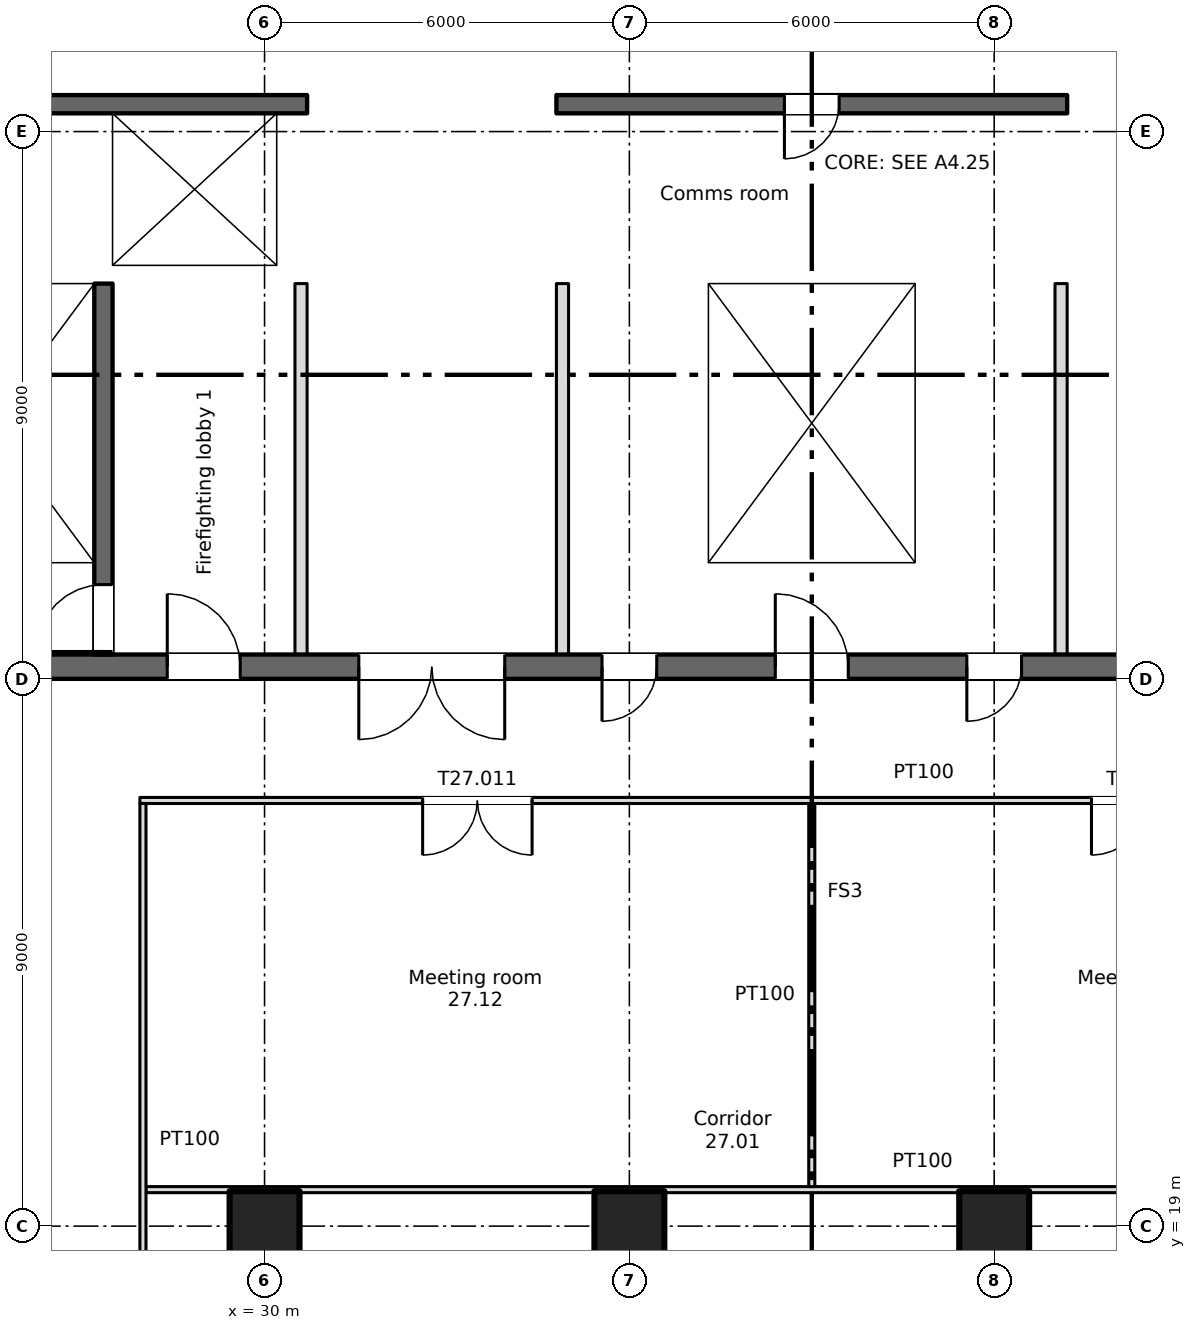
"""IFC4 building model, lengths in metres.
Left out: names, types, materials, properties, quantities, classifications, styles, units other than length and angle.
Written with IfcOpenShell. Run it as: python <this file> out.ifc"""

import sys

from ifc_helpers import new_model, si_unit, direction, frame, frame_2d, origin, origin_2d, place, context, subcontext, project, spatial, rectangle, extrude, element, fill, save


model = new_model("IFC4")
c1 = context("Model", 3, precision=1e-05, world=origin(), true_north=direction((0.0, 1.0)))
c2 = subcontext(c1, "Body", "Model", "MODEL_VIEW")
j1 = project(units=[si_unit("LENGTHUNIT", "METRE"), si_unit("PLANEANGLEUNIT", "RADIAN")], contexts=[c1])
p1 = place(None, origin())
s1 = spatial("IfcSite", under=j1, at=p1, CompositionType="ELEMENT")
p2 = place(p1, origin())
s2 = spatial("IfcBuilding", under=s1, at=p2, CompositionType="ELEMENT")
p3 = place(p2, frame((0.0, 0.0, 185.5)))
s3 = spatial("IfcBuildingStorey", under=s2, at=p3, CompositionType="ELEMENT", Elevation=185.5)
for number, where, z_axis, x_axis in (
    (1, (30.0, 19.0, 0.0), (0.0, 0.0, 1.0), (1.0, 0.0, 0.0)),
    (2, (36.0, 19.0, 0.0), (0.0, 0.0, 1.0), (1.0, 0.0, 0.0)),
    (3, (42.0, 19.0, 0.0), (0.0, 0.0, 1.0), (1.0, 0.0, 0.0)),
):
    element("IfcColumn", number, at=place(p3, frame(where, z_axis=z_axis, x_axis=x_axis)), inside=s3, PredefinedType="COLUMN", context=c2, shape_type="SweptSolid", body=[
        extrude(rectangle(XDim=1.15, YDim=1.15, at=origin_2d()), origin(), (0.0, 0.0, 1.0), 3.35),
    ])
p4 = place(p3, frame((6.6, 28.2, 0.0), z_axis=(0.0, 0.0, 1.0), x_axis=(1.0, 0.0, 0.0)))
e4 = element("IfcWall", 4, at=p4, inside=s3, PredefinedType="SHEAR", context=c2, shape_type="SweptSolid", body=[
    extrude(rectangle(XDim=57.9, YDim=0.4, at=frame_2d((28.95, 0.0))), origin(), (0.0, 0.0, 1.0), 3.35),
])
p5 = place(p4, frame((12.913, 0.0, 0.0)))
e5 = element("IfcOpeningElement", 5, at=p5, cuts=e4, PredefinedType="OPENING", context=c2, shape_type="SweptSolid", body=[
    extrude(rectangle(XDim=0.9, YDim=2.1, at=frame_2d((0.45, 1.05))), frame((0.0, 0.21, 0.0), z_axis=(0.0, -1.0, 0.0), x_axis=(1.0, 0.0, 0.0)), (0.0, 0.0, 1.0), 0.42),
])
p6 = place(p4, frame((15.488, 0.0, 0.0)))
e6 = element("IfcOpeningElement", 6, at=p6, cuts=e4, PredefinedType="OPENING", context=c2, shape_type="SweptSolid", body=[
    extrude(rectangle(XDim=0.9, YDim=2.1, at=frame_2d((0.45, 1.05))), frame((0.0, 0.21, 0.0), z_axis=(0.0, -1.0, 0.0), x_axis=(1.0, 0.0, 0.0)), (0.0, 0.0, 1.0), 0.42),
])
p7 = place(p4, frame((48.413, 0.0, 0.0)))
e7 = element("IfcOpeningElement", 7, at=p7, cuts=e4, PredefinedType="OPENING", context=c2, shape_type="SweptSolid", body=[
    extrude(rectangle(XDim=0.9, YDim=2.1, at=frame_2d((0.45, 1.05))), frame((0.0, 0.21, 0.0), z_axis=(0.0, -1.0, 0.0), x_axis=(1.0, 0.0, 0.0)), (0.0, 0.0, 1.0), 0.42),
])
p8 = place(p4, frame((50.988, 0.0, 0.0)))
e8 = element("IfcOpeningElement", 8, at=p8, cuts=e4, PredefinedType="OPENING", context=c2, shape_type="SweptSolid", body=[
    extrude(rectangle(XDim=0.9, YDim=2.1, at=frame_2d((0.45, 1.05))), frame((0.0, 0.21, 0.0), z_axis=(0.0, -1.0, 0.0), x_axis=(1.0, 0.0, 0.0)), (0.0, 0.0, 1.0), 0.42),
])
p9 = place(p4, frame((0.663, 0.0, 0.0)))
e9 = element("IfcOpeningElement", 9, at=p9, cuts=e4, PredefinedType="OPENING", context=c2, shape_type="SweptSolid", body=[
    extrude(rectangle(XDim=0.9, YDim=2.1, at=frame_2d((0.45, 1.05))), frame((0.0, 0.21, 0.0), z_axis=(0.0, -1.0, 0.0), x_axis=(1.0, 0.0, 0.0)), (0.0, 0.0, 1.0), 0.42),
])
p10 = place(p4, frame((2.238, 0.0, 0.0)))
e10 = element("IfcOpeningElement", 10, at=p10, cuts=e4, PredefinedType="OPENING", context=c2, shape_type="SweptSolid", body=[
    extrude(rectangle(XDim=0.9, YDim=2.1, at=frame_2d((0.45, 1.05))), frame((0.0, 0.21, 0.0), z_axis=(0.0, -1.0, 0.0), x_axis=(1.0, 0.0, 0.0)), (0.0, 0.0, 1.0), 0.42),
])
p11 = place(p4, frame((4.8, 0.0, 0.0)))
e11 = element("IfcOpeningElement", 11, at=p11, cuts=e4, PredefinedType="OPENING", context=c2, shape_type="SweptSolid", body=[
    extrude(rectangle(XDim=1.2, YDim=2.1, at=frame_2d((0.6, 1.05))), frame((0.0, 0.21, 0.0), z_axis=(0.0, -1.0, 0.0), x_axis=(1.0, 0.0, 0.0)), (0.0, 0.0, 1.0), 0.42),
])
p12 = place(p4, frame((31.8, 0.0, 0.0)))
e12 = element("IfcOpeningElement", 12, at=p12, cuts=e4, PredefinedType="OPENING", context=c2, shape_type="SweptSolid", body=[
    extrude(rectangle(XDim=1.2, YDim=2.1, at=frame_2d((0.6, 1.05))), frame((0.0, 0.21, 0.0), z_axis=(0.0, -1.0, 0.0), x_axis=(1.0, 0.0, 0.0)), (0.0, 0.0, 1.0), 0.42),
])
p13 = place(p4, frame((55.3, 0.0, 0.0)))
e13 = element("IfcOpeningElement", 13, at=p13, cuts=e4, PredefinedType="OPENING", context=c2, shape_type="SweptSolid", body=[
    extrude(rectangle(XDim=1.2, YDim=2.1, at=frame_2d((0.6, 1.05))), frame((0.0, 0.21, 0.0), z_axis=(0.0, -1.0, 0.0), x_axis=(1.0, 0.0, 0.0)), (0.0, 0.0, 1.0), 0.42),
])
p14 = place(p4, frame((21.8, 0.0, 0.0)))
e14 = element("IfcOpeningElement", 14, at=p14, cuts=e4, PredefinedType="OPENING", context=c2, shape_type="SweptSolid", body=[
    extrude(rectangle(XDim=1.2, YDim=2.1, at=frame_2d((0.6, 1.05))), frame((0.0, 0.21, 0.0), z_axis=(0.0, -1.0, 0.0), x_axis=(1.0, 0.0, 0.0)), (0.0, 0.0, 1.0), 0.42),
])
p15 = place(p4, frame((41.8, 0.0, 0.0)))
e15 = element("IfcOpeningElement", 15, at=p15, cuts=e4, PredefinedType="OPENING", context=c2, shape_type="SweptSolid", body=[
    extrude(rectangle(XDim=1.2, YDim=2.1, at=frame_2d((0.6, 1.05))), frame((0.0, 0.21, 0.0), z_axis=(0.0, -1.0, 0.0), x_axis=(1.0, 0.0, 0.0)), (0.0, 0.0, 1.0), 0.42),
])
p16 = place(p4, frame((24.95, 0.0, 0.0)))
e16 = element("IfcOpeningElement", 16, at=p16, cuts=e4, PredefinedType="OPENING", context=c2, shape_type="SweptSolid", body=[
    extrude(rectangle(XDim=2.4, YDim=2.1, at=frame_2d((1.2, 1.05))), frame((0.0, 0.21, 0.0), z_axis=(0.0, -1.0, 0.0), x_axis=(1.0, 0.0, 0.0)), (0.0, 0.0, 1.0), 0.42),
])
p17 = place(p4, frame((37.45, 0.0, 0.0)))
e17 = element("IfcOpeningElement", 17, at=p17, cuts=e4, PredefinedType="OPENING", context=c2, shape_type="SweptSolid", body=[
    extrude(rectangle(XDim=2.4, YDim=2.1, at=frame_2d((1.2, 1.05))), frame((0.0, 0.21, 0.0), z_axis=(0.0, -1.0, 0.0), x_axis=(1.0, 0.0, 0.0)), (0.0, 0.0, 1.0), 0.42),
])
p18 = place(p4, frame((8.1, 0.0, 0.0)))
e18 = element("IfcOpeningElement", 18, at=p18, cuts=e4, PredefinedType="OPENING", context=c2, shape_type="SweptSolid", body=[
    extrude(rectangle(XDim=2.4, YDim=2.1, at=frame_2d((1.2, 1.05))), frame((0.0, 0.21, 0.0), z_axis=(0.0, -1.0, 0.0), x_axis=(1.0, 0.0, 0.0)), (0.0, 0.0, 1.0), 0.42),
])
p19 = place(p4, frame((28.95, 0.0, 0.0)))
e19 = element("IfcOpeningElement", 19, at=p19, cuts=e4, PredefinedType="OPENING", context=c2, shape_type="SweptSolid", body=[
    extrude(rectangle(XDim=0.9, YDim=2.1, at=frame_2d((0.45, 1.05))), frame((0.0, 0.21, 0.0), z_axis=(0.0, -1.0, 0.0), x_axis=(1.0, 0.0, 0.0)), (0.0, 0.0, 1.0), 0.42),
])
p20 = place(p4, frame((34.95, 0.0, 0.0)))
e20 = element("IfcOpeningElement", 20, at=p20, cuts=e4, PredefinedType="OPENING", context=c2, shape_type="SweptSolid", body=[
    extrude(rectangle(XDim=0.9, YDim=2.1, at=frame_2d((0.45, 1.05))), frame((0.0, 0.21, 0.0), z_axis=(0.0, -1.0, 0.0), x_axis=(1.0, 0.0, 0.0)), (0.0, 0.0, 1.0), 0.42),
])
p21 = place(p3, frame((27.35, 28.4, 0.0), z_axis=(0.0, 0.0, 1.0), x_axis=(0.0, 1.0, 0.0)))
e21 = element("IfcWall", 21, at=p21, inside=s3, PredefinedType="SHEAR", context=c2, shape_type="SweptSolid", body=[
    extrude(rectangle(XDim=6.1, YDim=0.3, at=frame_2d((3.05, 0.0))), origin(), (0.0, 0.0, 1.0), 3.35),
])
p22 = place(p21, frame((0.05, 0.0, 0.0)))
e22 = element("IfcOpeningElement", 22, at=p22, cuts=e21, PredefinedType="OPENING", context=c2, shape_type="SweptSolid", body=[
    extrude(rectangle(XDim=1.1, YDim=2.1, at=frame_2d((0.55, 1.05))), frame((0.0, 0.16, 0.0), z_axis=(0.0, -1.0, 0.0), x_axis=(1.0, 0.0, 0.0)), (0.0, 0.0, 1.0), 0.32),
])
for number, where, z_axis, x_axis in (
    (23, (37.15, 28.4, 0.0), (0.0, 0.0, 1.0), (0.0, 1.0, 0.0)),
    (24, (40.85, 28.4, 0.0), (0.0, 0.0, 1.0), (0.0, 1.0, 0.0)),
):
    element("IfcWall", number, at=place(p3, frame(where, z_axis=z_axis, x_axis=x_axis)), inside=s3, PredefinedType="SHEAR", context=c2, shape_type="SweptSolid", body=[
        extrude(rectangle(XDim=6.1, YDim=0.3, at=frame_2d((3.05, 0.0))), origin(), (0.0, 0.0, 1.0), 3.35),
    ])
p23 = place(p3, frame((18.5, 34.65, 0.0), z_axis=(0.0, 0.0, 1.0), x_axis=(1.0, 0.0, 0.0)))
e25 = element("IfcWall", 25, at=p23, inside=s3, PredefinedType="SHEAR", context=c2, shape_type="SweptSolid", body=[
    extrude(rectangle(XDim=12.2, YDim=0.3, at=frame_2d((6.1, 0.0))), origin(), (0.0, 0.0, 1.0), 3.35),
])
p24 = place(p23, frame((9.8, 0.0, 0.0)))
e26 = element("IfcOpeningElement", 26, at=p24, cuts=e25, PredefinedType="OPENING", context=c2, shape_type="SweptSolid", body=[
    extrude(rectangle(XDim=1.1, YDim=2.1, at=frame_2d((0.55, 1.05))), frame((0.0, 0.16, 0.0), z_axis=(0.0, -1.0, 0.0), x_axis=(1.0, 0.0, 0.0)), (0.0, 0.0, 1.0), 0.32),
])
p25 = place(p3, frame((34.8, 34.65, 0.0), z_axis=(0.0, 0.0, 1.0), x_axis=(1.0, 0.0, 0.0)))
e27 = element("IfcWall", 27, at=p25, inside=s3, PredefinedType="SHEAR", context=c2, shape_type="SweptSolid", body=[
    extrude(rectangle(XDim=8.4, YDim=0.3, at=frame_2d((4.2, 0.0))), origin(), (0.0, 0.0, 1.0), 3.35),
])
p26 = place(p3, frame((30.7, 37.45, 0.0), z_axis=(0.0, 0.0, 1.0), x_axis=(-1.0, 0.0, 0.0)))
e28 = element("IfcWall", 28, at=p26, inside=s3, PredefinedType="SHEAR", context=c2, shape_type="SweptSolid", body=[
    extrude(rectangle(XDim=12.2, YDim=0.3, at=frame_2d((6.1, 0.0))), origin(), (0.0, 0.0, 1.0), 3.35),
])
p27 = place(p26, frame((7.4, 0.0, 0.0)))
e29 = element("IfcOpeningElement", 29, at=p27, cuts=e28, PredefinedType="OPENING", context=c2, shape_type="SweptSolid", body=[
    extrude(rectangle(XDim=0.9, YDim=2.1, at=frame_2d((0.45, 1.05))), frame((0.0, 0.16, 0.0), z_axis=(0.0, -1.0, 0.0), x_axis=(1.0, 0.0, 0.0)), (0.0, 0.0, 1.0), 0.32),
])
p28 = place(p3, frame((43.2, 37.45, 0.0), z_axis=(0.0, 0.0, 1.0), x_axis=(-1.0, 0.0, 0.0)))
e30 = element("IfcWall", 30, at=p28, inside=s3, PredefinedType="SHEAR", context=c2, shape_type="SweptSolid", body=[
    extrude(rectangle(XDim=8.4, YDim=0.3, at=frame_2d((4.2, 0.0))), origin(), (0.0, 0.0, 1.0), 3.35),
])
p29 = place(p28, frame((3.75, 0.0, 0.0)))
e31 = element("IfcOpeningElement", 31, at=p29, cuts=e30, PredefinedType="OPENING", context=c2, shape_type="SweptSolid", body=[
    extrude(rectangle(XDim=0.9, YDim=2.1, at=frame_2d((0.45, 1.05))), frame((0.0, 0.16, 0.0), z_axis=(0.0, -1.0, 0.0), x_axis=(1.0, 0.0, 0.0)), (0.0, 0.0, 1.0), 0.32),
])
p30 = place(p3, frame((27.35, 34.8, 0.0), z_axis=(0.0, 0.0, 1.0), x_axis=(0.0, 1.0, 0.0)))
e32 = element("IfcWall", 32, at=p30, inside=s3, PredefinedType="SHEAR", context=c2, shape_type="SweptSolid", body=[
    extrude(rectangle(XDim=2.5, YDim=0.3, at=frame_2d((1.25, 0.0))), origin(), (0.0, 0.0, 1.0), 3.35),
])
p31 = place(p3, frame((30.45, 34.8, 0.0), z_axis=(0.0, 0.0, 1.0), x_axis=(0.0, 1.0, 0.0)))
e33 = element("IfcWall", 33, at=p31, inside=s3, PredefinedType="SHEAR", context=c2, shape_type="SweptSolid", body=[
    extrude(rectangle(XDim=2.5, YDim=0.5, at=frame_2d((1.25, 0.0))), origin(), (0.0, 0.0, 1.0), 3.35),
])
for number, where, z_axis, x_axis in (
    (34, (34.95, 34.8, 0.0), (0.0, 0.0, 1.0), (0.0, 1.0, 0.0)),
    (35, (43.05, 34.8, 0.0), (0.0, 0.0, 1.0), (0.0, 1.0, 0.0)),
):
    element("IfcWall", number, at=place(p3, frame(where, z_axis=z_axis, x_axis=x_axis)), inside=s3, PredefinedType="SHEAR", context=c2, shape_type="SweptSolid", body=[
        extrude(rectangle(XDim=2.5, YDim=0.3, at=frame_2d((1.25, 0.0))), origin(), (0.0, 0.0, 1.0), 3.35),
    ])
for number, where, z_axis, x_axis in (
    (36, (30.6, 28.4, 0.0), (0.0, 0.0, 1.0), (0.0, 1.0, 0.0)),
    (37, (34.9, 28.4, 0.0), (0.0, 0.0, 1.0), (0.0, 1.0, 0.0)),
    (38, (43.1, 28.4, 0.0), (0.0, 0.0, 1.0), (0.0, 1.0, 0.0)),
):
    element("IfcWall", number, at=place(p3, frame(where, z_axis=z_axis, x_axis=x_axis)), inside=s3, PredefinedType="PARTITIONING", context=c2, shape_type="SweptSolid", body=[
        extrude(rectangle(XDim=6.1, YDim=0.2, at=frame_2d((3.05, 0.0))), origin(), (0.0, 0.0, 1.0), 3.35),
    ])
p32 = place(p3, frame((28.05, 19.6, 0.0), z_axis=(0.0, 0.0, 1.0), x_axis=(1.0, 0.0, 0.0)))
e39 = element("IfcWall", 39, at=p32, inside=s3, PredefinedType="PARTITIONING", context=c2, shape_type="SweptSolid", body=[
    extrude(rectangle(XDim=21.9, YDim=0.1, at=frame_2d((10.95, 0.0))), origin(), (0.0, 0.0, 1.0), 3.35),
])
p33 = place(p3, frame((27.95, 26.0, 0.0), z_axis=(0.0, 0.0, 1.0), x_axis=(1.0, 0.0, 0.0)))
e40 = element("IfcWall", 40, at=p33, inside=s3, PredefinedType="PARTITIONING", context=c2, shape_type="SweptSolid", body=[
    extrude(rectangle(XDim=22.1, YDim=0.1, at=frame_2d((11.05, 0.0))), origin(), (0.0, 0.0, 1.0), 3.35),
])
p34 = place(p33, frame((4.65, 0.0, 0.0)))
e41 = element("IfcOpeningElement", 41, at=p34, cuts=e40, PredefinedType="OPENING", context=c2, shape_type="SweptSolid", body=[
    extrude(rectangle(XDim=1.8, YDim=2.1, at=frame_2d((0.9, 1.05))), frame((0.0, 0.06, 0.0), z_axis=(0.0, -1.0, 0.0), x_axis=(1.0, 0.0, 0.0)), (0.0, 0.0, 1.0), 0.12),
])
p35 = place(p33, frame((15.65, 0.0, 0.0)))
e42 = element("IfcOpeningElement", 42, at=p35, cuts=e40, PredefinedType="OPENING", context=c2, shape_type="SweptSolid", body=[
    extrude(rectangle(XDim=1.8, YDim=2.1, at=frame_2d((0.9, 1.05))), frame((0.0, 0.06, 0.0), z_axis=(0.0, -1.0, 0.0), x_axis=(1.0, 0.0, 0.0)), (0.0, 0.0, 1.0), 0.12),
])
p36 = place(p3, frame((28.0, 12.65, 0.0), z_axis=(0.0, 0.0, 1.0), x_axis=(0.0, 1.0, 0.0)))
e43 = element("IfcWall", 43, at=p36, inside=s3, PredefinedType="PARTITIONING", context=c2, shape_type="SweptSolid", body=[
    extrude(rectangle(XDim=13.3, YDim=0.1, at=frame_2d((6.65, 0.0))), origin(), (0.0, 0.0, 1.0), 3.35),
])
p37 = place(p3, frame((39.0, 19.65, 0.0), z_axis=(0.0, 0.0, 1.0), x_axis=(0.0, 1.0, 0.0)))
e44 = element("IfcWall", 44, at=p37, inside=s3, PredefinedType="PARTITIONING", context=c2, shape_type="SweptSolid", body=[
    extrude(rectangle(XDim=6.3, YDim=0.1, at=frame_2d((3.15, 0.0))), origin(), (0.0, 0.0, 1.0), 3.35),
])
p38 = place(p29, origin())
e45 = element("IfcDoor", 45, at=p38, inside=s3, OperationType="SINGLE_SWING_RIGHT", PredefinedType="DOOR", context=c2, shape_type="SweptSolid", body=[
    extrude(rectangle(XDim=0.9, YDim=2.1, at=frame_2d((0.45, 1.05))), frame((0.0, 0.025, 0.0), z_axis=(0.0, -1.0, 0.0), x_axis=(1.0, 0.0, 0.0)), (0.0, 0.0, 1.0), 0.05),
])
fill(e31, e45)
p39 = place(p24, origin())
e46 = element("IfcDoor", 46, at=p39, inside=s3, OperationType="SLIDING_TO_LEFT", PredefinedType="DOOR", context=c2, shape_type="SweptSolid", body=[
    extrude(rectangle(XDim=1.1, YDim=2.1, at=frame_2d((0.55, 1.05))), frame((0.0, 0.025, 0.0), z_axis=(0.0, -1.0, 0.0), x_axis=(1.0, 0.0, 0.0)), (0.0, 0.0, 1.0), 0.05),
])
fill(e26, e46)
p40 = place(p22, origin())
e47 = element("IfcDoor", 47, at=p40, inside=s3, OperationType="SINGLE_SWING_LEFT", PredefinedType="DOOR", context=c2, shape_type="SweptSolid", body=[
    extrude(rectangle(XDim=1.1, YDim=2.1, at=frame_2d((0.55, 1.05))), frame((0.0, 0.025, 0.0), z_axis=(0.0, -1.0, 0.0), x_axis=(1.0, 0.0, 0.0)), (0.0, 0.0, 1.0), 0.05),
])
fill(e22, e47)
p41 = place(p12, origin())
e48 = element("IfcDoor", 48, at=p41, inside=s3, OperationType="SINGLE_SWING_LEFT", PredefinedType="DOOR", context=c2, shape_type="SweptSolid", body=[
    extrude(rectangle(XDim=1.2, YDim=2.1, at=frame_2d((0.6, 1.05))), frame((0.0, 0.025, 0.0), z_axis=(0.0, -1.0, 0.0), x_axis=(1.0, 0.0, 0.0)), (0.0, 0.0, 1.0), 0.05),
])
fill(e12, e48)
p42 = place(p14, origin())
e49 = element("IfcDoor", 49, at=p42, inside=s3, OperationType="SINGLE_SWING_LEFT", PredefinedType="DOOR", context=c2, shape_type="SweptSolid", body=[
    extrude(rectangle(XDim=1.2, YDim=2.1, at=frame_2d((0.6, 1.05))), frame((0.0, 0.025, 0.0), z_axis=(0.0, -1.0, 0.0), x_axis=(1.0, 0.0, 0.0)), (0.0, 0.0, 1.0), 0.05),
])
fill(e14, e49)
p43 = place(p16, origin())
e50 = element("IfcDoor", 50, at=p43, inside=s3, OperationType="DOUBLE_DOOR_SINGLE_SWING", PredefinedType="DOOR", context=c2, shape_type="SweptSolid", body=[
    extrude(rectangle(XDim=2.4, YDim=2.1, at=frame_2d((1.2, 1.05))), frame((0.0, 0.025, 0.0), z_axis=(0.0, -1.0, 0.0), x_axis=(1.0, 0.0, 0.0)), (0.0, 0.0, 1.0), 0.05),
])
fill(e16, e50)
p44 = place(p19, origin())
e51 = element("IfcDoor", 51, at=p44, inside=s3, OperationType="SINGLE_SWING_LEFT", PredefinedType="DOOR", context=c2, shape_type="SweptSolid", body=[
    extrude(rectangle(XDim=0.9, YDim=2.1, at=frame_2d((0.45, 1.05))), frame((0.0, 0.025, 0.0), z_axis=(0.0, -1.0, 0.0), x_axis=(1.0, 0.0, 0.0)), (0.0, 0.0, 1.0), 0.05),
])
fill(e19, e51)
p45 = place(p20, origin())
e52 = element("IfcDoor", 52, at=p45, inside=s3, OperationType="SINGLE_SWING_LEFT", PredefinedType="DOOR", context=c2, shape_type="SweptSolid", body=[
    extrude(rectangle(XDim=0.9, YDim=2.1, at=frame_2d((0.45, 1.05))), frame((0.0, 0.025, 0.0), z_axis=(0.0, -1.0, 0.0), x_axis=(1.0, 0.0, 0.0)), (0.0, 0.0, 1.0), 0.05),
])
fill(e20, e52)
p46 = place(p34, origin())
e53 = element("IfcDoor", 53, at=p46, inside=s3, OperationType="DOUBLE_DOOR_SINGLE_SWING", PredefinedType="DOOR", context=c2, shape_type="SweptSolid", body=[
    extrude(rectangle(XDim=1.8, YDim=2.1, at=frame_2d((0.9, 1.05))), frame((0.0, 0.025, 0.0), z_axis=(0.0, -1.0, 0.0), x_axis=(1.0, 0.0, 0.0)), (0.0, 0.0, 1.0), 0.05),
])
fill(e41, e53)
p47 = place(p35, origin())
e54 = element("IfcDoor", 54, at=p47, inside=s3, OperationType="DOUBLE_DOOR_SINGLE_SWING", PredefinedType="DOOR", context=c2, shape_type="SweptSolid", body=[
    extrude(rectangle(XDim=1.8, YDim=2.1, at=frame_2d((0.9, 1.05))), frame((0.0, 0.025, 0.0), z_axis=(0.0, -1.0, 0.0), x_axis=(1.0, 0.0, 0.0)), (0.0, 0.0, 1.0), 0.05),
])
fill(e42, e54)
save(model, sys.argv[1])
